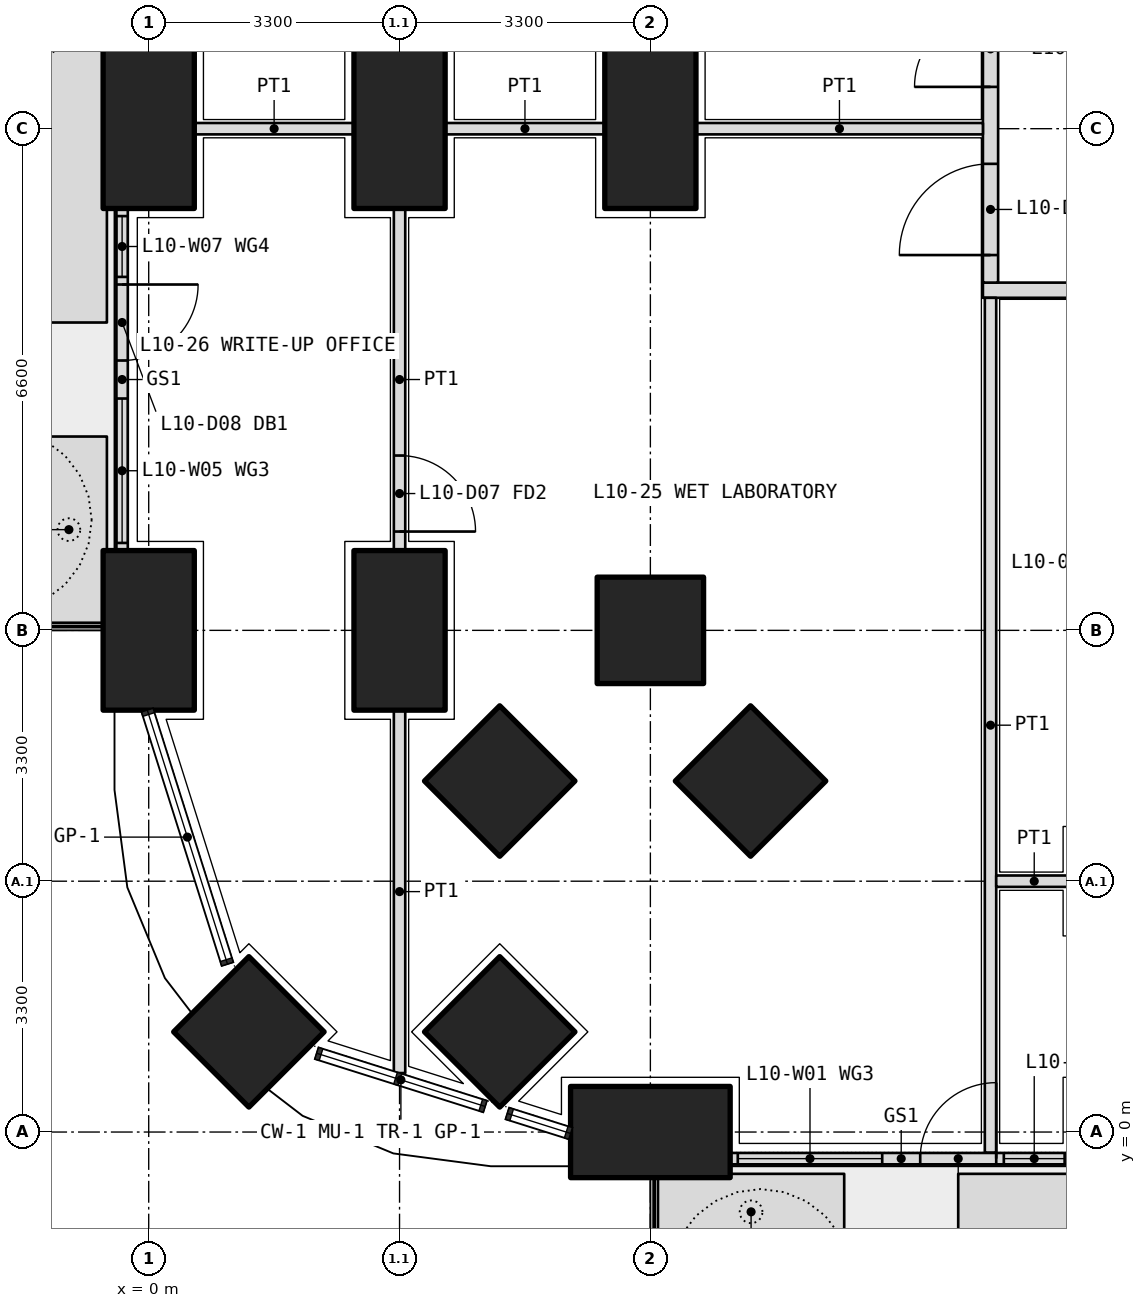
"""IFC4 building model, lengths in metres.
Left out: names, types, materials, properties, quantities, classifications, styles, units other than length and angle.
Written with IfcOpenShell. Run it as: python <this file> out.ifc"""

import sys

from ifc_helpers import new_model, si_unit, direction, frame, frame_2d, origin, origin_2d, place, context, subcontext, project, spatial, polyline, rectangle, outline, extrude, element, fill, save


model = new_model("IFC4")
c1 = context("Model", 3, precision=1e-05, world=origin(), true_north=direction((0.0, 1.0)))
c2 = subcontext(c1, "Body", "Model", "MODEL_VIEW")
j1 = project(units=[si_unit("LENGTHUNIT", "METRE"), si_unit("PLANEANGLEUNIT", "RADIAN")], contexts=[c1])
p1 = place(None, origin())
s1 = spatial("IfcSite", under=j1, at=p1, CompositionType="ELEMENT")
p2 = place(p1, origin())
s2 = spatial("IfcBuilding", under=s1, at=p2, CompositionType="ELEMENT")
p3 = place(p2, frame((0.0, 0.0, 46.5)))
s3 = spatial("IfcBuildingStorey", under=s2, at=p3, CompositionType="ELEMENT", Elevation=46.5)
p4 = place(p3, frame((1.318, 1.318, 0.0), z_axis=(0.0, 0.0, 1.0), x_axis=(0.707106781187, 0.707106781187, 0.0)))
e1 = element("IfcColumn", 1, at=p4, inside=s3, PredefinedType="COLUMN", context=c2, shape_type="SweptSolid", body=[
    extrude(rectangle(XDim=1.4, YDim=1.4, at=origin_2d()), origin(), (0.0, 0.0, 1.0), 4.2),
])
for number, where, z_axis, x_axis in (
    (2, (6.6, 0.0, 0.0), (0.0, 0.0, 1.0), (1.0, 0.0, 0.0)),
    (3, (0.0, 6.6, 0.0), (0.0, 0.0, 1.0), (0.0, 1.0, 0.0)),
    (4, (0.0, 13.2, 0.0), (0.0, 0.0, 1.0), (0.0, 1.0, 0.0)),
):
    element("IfcColumn", number, at=place(p3, frame(where, z_axis=z_axis, x_axis=x_axis)), inside=s3, PredefinedType="COLUMN", context=c2, shape_type="SweptSolid", body=[
        extrude(rectangle(XDim=2.1, YDim=1.2, at=origin_2d()), origin(), (0.0, 0.0, 1.0), 4.2),
    ])
for number, where, z_axis, x_axis in (
    (5, (6.6, 6.6, 0.0), (0.0, 0.0, 1.0), (1.0, 0.0, 0.0)),
    (6, (4.618, 1.318, 0.0), (0.0, 0.0, 1.0), (0.707, 0.707, 0.0)),
):
    element("IfcColumn", number, at=place(p3, frame(where, z_axis=z_axis, x_axis=x_axis)), inside=s3, PredefinedType="COLUMN", context=c2, shape_type="SweptSolid", body=[
        extrude(rectangle(XDim=1.4, YDim=1.4, at=origin_2d()), origin(), (0.0, 0.0, 1.0), 4.2),
    ])
for number, where, z_axis, x_axis in (
    (7, (3.3, 6.6, 0.0), (0.0, 0.0, 1.0), (0.0, 1.0, 0.0)),
    (8, (3.3, 13.2, 0.0), (0.0, 0.0, 1.0), (0.0, 1.0, 0.0)),
):
    element("IfcColumn", number, at=place(p3, frame(where, z_axis=z_axis, x_axis=x_axis)), inside=s3, PredefinedType="COLUMN", context=c2, shape_type="SweptSolid", body=[
        extrude(rectangle(XDim=2.1, YDim=1.2, at=origin_2d()), origin(), (0.0, 0.0, 1.0), 4.2),
    ])
for number, where, z_axis, x_axis in (
    (9, (4.618, 4.618, 0.0), (0.0, 0.0, 1.0), (0.707, 0.707, 0.0)),
    (10, (7.918, 4.618, 0.0), (0.0, 0.0, 1.0), (0.707, 0.707, 0.0)),
):
    element("IfcColumn", number, at=place(p3, frame(where, z_axis=z_axis, x_axis=x_axis)), inside=s3, PredefinedType="COLUMN", context=c2, shape_type="SweptSolid", body=[
        extrude(rectangle(XDim=1.4, YDim=1.4, at=origin_2d()), origin(), (0.0, 0.0, 1.0), 4.2),
    ])
p5 = place(p3, frame((6.6, 13.2, 0.0), z_axis=(0.0, 0.0, 1.0), x_axis=(0.0, 1.0, 0.0)))
e11 = element("IfcColumn", 11, at=p5, inside=s3, PredefinedType="COLUMN", context=c2, shape_type="SweptSolid", body=[
    extrude(rectangle(XDim=2.1, YDim=1.2, at=origin_2d()), origin(), (0.0, 0.0, 1.0), 4.2),
])
p6 = place(p3, origin())
e12 = element("IfcWall", 12, at=p6, inside=s3, PredefinedType="USERDEFINED", context=c2, shape_type="SweptSolid", body=[
    extrude(outline(polyline([(6.7, -1.55), (9.15, -1.55), (9.15, -0.55), (6.7, -0.55), (6.7, -1.55)]), holes=[polyline([(6.85, -1.4), (9.0, -1.4), (9.0, -0.7), (6.85, -0.7), (6.85, -1.4)])]), origin(), (0.0, 0.0, 1.0), 1.05),
])
p7 = place(p3, origin())
e13 = element("IfcWall", 13, at=p7, inside=s3, PredefinedType="USERDEFINED", context=c2, shape_type="SweptSolid", body=[
    extrude(outline(polyline([(10.65, -1.55), (19.7, -1.55), (19.7, -0.55), (10.65, -0.55), (10.65, -1.55)]), holes=[polyline([(10.8, -1.4), (19.55, -1.4), (19.55, -0.7), (10.8, -0.7), (10.8, -1.4)])]), origin(), (0.0, 0.0, 1.0), 1.05),
])
p8 = place(p3, origin())
e14 = element("IfcWall", 14, at=p8, inside=s3, PredefinedType="USERDEFINED", context=c2, shape_type="SweptSolid", body=[
    extrude(outline(polyline([(-1.55, 6.7), (-0.55, 6.7), (-0.55, 9.15), (-1.55, 9.15), (-1.55, 6.7)]), holes=[polyline([(-1.4, 6.85), (-0.7, 6.85), (-0.7, 9.0), (-1.4, 9.0), (-1.4, 6.85)])]), origin(), (0.0, 0.0, 1.0), 1.05),
])
p9 = place(p3, origin())
e15 = element("IfcWall", 15, at=p9, inside=s3, PredefinedType="USERDEFINED", context=c2, shape_type="SweptSolid", body=[
    extrude(outline(polyline([(-1.55, 10.65), (-0.55, 10.65), (-0.55, 19.7), (-1.55, 19.7), (-1.55, 10.65)]), holes=[polyline([(-1.4, 10.8), (-0.7, 10.8), (-0.7, 19.55), (-1.4, 19.55), (-1.4, 10.8)])]), origin(), (0.0, 0.0, 1.0), 1.05),
])
p10 = place(p3, frame((7.65, -0.35, 0.0), z_axis=(0.0, 0.0, 1.0), x_axis=(1.0, 0.0, 0.0)))
e16 = element("IfcWall", 16, at=p10, inside=s3, PredefinedType="SOLIDWALL", context=c2, shape_type="SweptSolid", body=[
    extrude(rectangle(XDim=4.5, YDim=0.15, at=frame_2d((2.25, 0.0))), origin(), (0.0, 0.0, 1.0), 2.7),
])
p11 = place(p10, frame((2.5, 0.0, 0.0)))
e17 = element("IfcOpeningElement", 17, at=p11, cuts=e16, PredefinedType="OPENING", context=c2, shape_type="SweptSolid", body=[
    extrude(rectangle(XDim=1.0, YDim=2.4, at=frame_2d((0.5, 1.2))), frame((0.0, 0.085, 0.0), z_axis=(0.0, -1.0, 0.0), x_axis=(1.0, 0.0, 0.0)), (0.0, 0.0, 1.0), 0.17),
])
p12 = place(p10, frame((0.1, 0.0, 0.1)))
e18 = element("IfcOpeningElement", 18, at=p12, cuts=e16, PredefinedType="OPENING", context=c2, shape_type="SweptSolid", body=[
    extrude(rectangle(XDim=1.9, YDim=2.3, at=frame_2d((0.95, 1.15))), frame((0.0, 0.085, 0.0), z_axis=(0.0, -1.0, 0.0), x_axis=(1.0, 0.0, 0.0)), (0.0, 0.0, 1.0), 0.17),
])
p13 = place(p10, frame((3.6, 0.0, 0.1)))
e19 = element("IfcOpeningElement", 19, at=p13, cuts=e16, PredefinedType="OPENING", context=c2, shape_type="SweptSolid", body=[
    extrude(rectangle(XDim=0.8, YDim=2.3, at=frame_2d((0.4, 1.15))), frame((0.0, 0.085, 0.0), z_axis=(0.0, -1.0, 0.0), x_axis=(1.0, 0.0, 0.0)), (0.0, 0.0, 1.0), 0.17),
])
p14 = place(p3, frame((-0.35, 12.15, 0.0), z_axis=(0.0, 0.0, 1.0), x_axis=(0.0, -1.0, 0.0)))
e20 = element("IfcWall", 20, at=p14, inside=s3, PredefinedType="SOLIDWALL", context=c2, shape_type="SweptSolid", body=[
    extrude(rectangle(XDim=4.5, YDim=0.15, at=frame_2d((2.25, 0.0))), origin(), (0.0, 0.0, 1.0), 2.7),
])
p15 = place(p14, frame((1.0, 0.0, 0.0)))
e21 = element("IfcOpeningElement", 21, at=p15, cuts=e20, PredefinedType="OPENING", context=c2, shape_type="SweptSolid", body=[
    extrude(rectangle(XDim=1.0, YDim=2.4, at=frame_2d((0.5, 1.2))), frame((0.0, 0.085, 0.0), z_axis=(0.0, -1.0, 0.0), x_axis=(1.0, 0.0, 0.0)), (0.0, 0.0, 1.0), 0.17),
])
p16 = place(p14, frame((0.1, 0.0, 0.1)))
e22 = element("IfcOpeningElement", 22, at=p16, cuts=e20, PredefinedType="OPENING", context=c2, shape_type="SweptSolid", body=[
    extrude(rectangle(XDim=0.8, YDim=2.3, at=frame_2d((0.4, 1.15))), frame((0.0, 0.085, 0.0), z_axis=(0.0, -1.0, 0.0), x_axis=(1.0, 0.0, 0.0)), (0.0, 0.0, 1.0), 0.17),
])
p17 = place(p14, frame((2.5, 0.0, 0.1)))
e23 = element("IfcOpeningElement", 23, at=p17, cuts=e20, PredefinedType="OPENING", context=c2, shape_type="SweptSolid", body=[
    extrude(rectangle(XDim=1.9, YDim=2.3, at=frame_2d((0.95, 1.15))), frame((0.0, 0.085, 0.0), z_axis=(0.0, -1.0, 0.0), x_axis=(1.0, 0.0, 0.0)), (0.0, 0.0, 1.0), 0.17),
])
p18 = place(p3, frame((10.975, 11.075, 0.0), z_axis=(0.0, 0.0, 1.0), x_axis=(1.0, 0.0, 0.0)))
e24 = element("IfcWall", 24, at=p18, inside=s3, PredefinedType="PARTITIONING", context=c2, shape_type="SweptSolid", body=[
    extrude(rectangle(XDim=30.85, YDim=0.2, at=frame_2d((15.425, 0.0))), origin(), (0.0, 0.0, 1.0), 2.85),
])
p19 = place(p18, frame((2.312, 0.0, 0.0)))
e25 = element("IfcOpeningElement", 25, at=p19, cuts=e24, PredefinedType="OPENING", context=c2, shape_type="SweptSolid", body=[
    extrude(rectangle(XDim=1.0, YDim=2.1, at=frame_2d((0.5, 1.05))), frame((0.0, 0.11, 0.0), z_axis=(0.0, -1.0, 0.0), x_axis=(1.0, 0.0, 0.0)), (0.0, 0.0, 1.0), 0.22),
])
p20 = place(p18, frame((6.575, 0.0, 0.0)))
e26 = element("IfcOpeningElement", 26, at=p20, cuts=e24, PredefinedType="OPENING", context=c2, shape_type="SweptSolid", body=[
    extrude(rectangle(XDim=1.2, YDim=2.1, at=frame_2d((0.6, 1.05))), frame((0.0, 0.11, 0.0), z_axis=(0.0, -1.0, 0.0), x_axis=(1.0, 0.0, 0.0)), (0.0, 0.0, 1.0), 0.22),
])
p21 = place(p18, frame((13.275, 0.0, 0.0)))
e27 = element("IfcOpeningElement", 27, at=p21, cuts=e24, PredefinedType="OPENING", context=c2, shape_type="SweptSolid", body=[
    extrude(rectangle(XDim=1.0, YDim=2.1, at=frame_2d((0.5, 1.05))), frame((0.0, 0.11, 0.0), z_axis=(0.0, -1.0, 0.0), x_axis=(1.0, 0.0, 0.0)), (0.0, 0.0, 1.0), 0.22),
])
p22 = place(p18, frame((19.975, 0.0, 0.0)))
e28 = element("IfcOpeningElement", 28, at=p22, cuts=e24, PredefinedType="OPENING", context=c2, shape_type="SweptSolid", body=[
    extrude(rectangle(XDim=1.0, YDim=2.1, at=frame_2d((0.5, 1.05))), frame((0.0, 0.11, 0.0), z_axis=(0.0, -1.0, 0.0), x_axis=(1.0, 0.0, 0.0)), (0.0, 0.0, 1.0), 0.22),
])
p23 = place(p18, frame((23.275, 0.0, 0.0)))
e29 = element("IfcOpeningElement", 29, at=p23, cuts=e24, PredefinedType="OPENING", context=c2, shape_type="SweptSolid", body=[
    extrude(rectangle(XDim=1.0, YDim=2.1, at=frame_2d((0.5, 1.05))), frame((0.0, 0.11, 0.0), z_axis=(0.0, -1.0, 0.0), x_axis=(1.0, 0.0, 0.0)), (0.0, 0.0, 1.0), 0.22),
])
p24 = place(p18, frame((27.438, 0.0, 0.0)))
e30 = element("IfcOpeningElement", 30, at=p24, cuts=e24, PredefinedType="OPENING", context=c2, shape_type="SweptSolid", body=[
    extrude(rectangle(XDim=1.2, YDim=2.1, at=frame_2d((0.6, 1.05))), frame((0.0, 0.11, 0.0), z_axis=(0.0, -1.0, 0.0), x_axis=(1.0, 0.0, 0.0)), (0.0, 0.0, 1.0), 0.22),
])
p25 = place(p3, frame((11.075, 11.175, 0.0), z_axis=(0.0, 0.0, 1.0), x_axis=(0.0, 1.0, 0.0)))
e31 = element("IfcWall", 31, at=p25, inside=s3, PredefinedType="PARTITIONING", context=c2, shape_type="SweptSolid", body=[
    extrude(rectangle(XDim=15.225, YDim=0.2, at=frame_2d((7.612, 0.0))), origin(), (0.0, 0.0, 1.0), 2.85),
])
p26 = place(p25, frame((0.363, 0.0, 0.0)))
e32 = element("IfcOpeningElement", 32, at=p26, cuts=e31, PredefinedType="OPENING", context=c2, shape_type="SweptSolid", body=[
    extrude(rectangle(XDim=1.2, YDim=2.1, at=frame_2d((0.6, 1.05))), frame((0.0, 0.11, 0.0), z_axis=(0.0, -1.0, 0.0), x_axis=(1.0, 0.0, 0.0)), (0.0, 0.0, 1.0), 0.22),
])
p27 = place(p25, frame((2.575, 0.0, 0.0)))
e33 = element("IfcOpeningElement", 33, at=p27, cuts=e31, PredefinedType="OPENING", context=c2, shape_type="SweptSolid", body=[
    extrude(rectangle(XDim=1.0, YDim=2.1, at=frame_2d((0.5, 1.05))), frame((0.0, 0.11, 0.0), z_axis=(0.0, -1.0, 0.0), x_axis=(1.0, 0.0, 0.0)), (0.0, 0.0, 1.0), 0.22),
])
p28 = place(p25, frame((5.625, 0.0, 0.0)))
e34 = element("IfcOpeningElement", 34, at=p28, cuts=e31, PredefinedType="OPENING", context=c2, shape_type="SweptSolid", body=[
    extrude(rectangle(XDim=0.9, YDim=2.1, at=frame_2d((0.45, 1.05))), frame((0.0, 0.11, 0.0), z_axis=(0.0, -1.0, 0.0), x_axis=(1.0, 0.0, 0.0)), (0.0, 0.0, 1.0), 0.22),
])
p29 = place(p25, frame((9.425, 0.0, 0.0)))
e35 = element("IfcOpeningElement", 35, at=p29, cuts=e31, PredefinedType="OPENING", context=c2, shape_type="SweptSolid", body=[
    extrude(rectangle(XDim=0.9, YDim=2.1, at=frame_2d((0.45, 1.05))), frame((0.0, 0.11, 0.0), z_axis=(0.0, -1.0, 0.0), x_axis=(1.0, 0.0, 0.0)), (0.0, 0.0, 1.0), 0.22),
])
p30 = place(p25, frame((12.975, 0.0, 0.0)))
e36 = element("IfcOpeningElement", 36, at=p30, cuts=e31, PredefinedType="OPENING", context=c2, shape_type="SweptSolid", body=[
    extrude(rectangle(XDim=1.0, YDim=2.1, at=frame_2d((0.5, 1.05))), frame((0.0, 0.11, 0.0), z_axis=(0.0, -1.0, 0.0), x_axis=(1.0, 0.0, 0.0)), (0.0, 0.0, 1.0), 0.22),
])
p31 = place(p3, frame((11.075, -0.27, 0.0), z_axis=(0.0, 0.0, 1.0), x_axis=(0.0, 1.0, 0.0)))
e37 = element("IfcWall", 37, at=p31, inside=s3, PredefinedType="PARTITIONING", context=c2, shape_type="SweptSolid", body=[
    extrude(rectangle(XDim=11.245, YDim=0.15, at=frame_2d((5.623, 0.0))), origin(), (0.0, 0.0, 1.0), 2.7),
])
p32 = place(p3, frame((11.15, 3.3, 0.0), z_axis=(0.0, 0.0, 1.0), x_axis=(1.0, 0.0, 0.0)))
e38 = element("IfcWall", 38, at=p32, inside=s3, PredefinedType="PARTITIONING", context=c2, shape_type="SweptSolid", body=[
    extrude(rectangle(XDim=1.0, YDim=0.15, at=frame_2d((0.5, 0.0))), origin(), (0.0, 0.0, 1.0), 3.9),
])
p33 = place(p3, frame((3.3, 12.15, 0.0), z_axis=(0.0, 0.0, 1.0), x_axis=(0.0, -1.0, 0.0)))
e39 = element("IfcWall", 39, at=p33, inside=s3, PredefinedType="PARTITIONING", context=c2, shape_type="SweptSolid", body=[
    extrude(rectangle(XDim=4.5, YDim=0.15, at=frame_2d((2.25, 0.0))), origin(), (0.0, 0.0, 1.0), 3.9),
])
p34 = place(p33, frame((3.25, 0.0, 0.0)))
e40 = element("IfcOpeningElement", 40, at=p34, cuts=e39, PredefinedType="OPENING", context=c2, shape_type="SweptSolid", body=[
    extrude(rectangle(XDim=1.0, YDim=2.1, at=frame_2d((0.5, 1.05))), frame((0.0, 0.085, 0.0), z_axis=(0.0, -1.0, 0.0), x_axis=(1.0, 0.0, 0.0)), (0.0, 0.0, 1.0), 0.17),
])
p35 = place(p3, frame((3.3, 5.55, 0.0), z_axis=(0.0, 0.0, 1.0), x_axis=(0.0, -1.0, 0.0)))
e41 = element("IfcWall", 41, at=p35, inside=s3, PredefinedType="PARTITIONING", context=c2, shape_type="SweptSolid", body=[
    extrude(rectangle(XDim=4.774, YDim=0.15, at=frame_2d((2.387, 0.0))), origin(), (0.0, 0.0, 1.0), 2.7),
])
p36 = place(p3, frame((0.6, 13.2, 0.0), z_axis=(0.0, 0.0, 1.0), x_axis=(1.0, 0.0, 0.0)))
e42 = element("IfcWall", 42, at=p36, inside=s3, PredefinedType="PARTITIONING", context=c2, shape_type="SweptSolid", body=[
    extrude(rectangle(XDim=2.1, YDim=0.15, at=frame_2d((1.05, 0.0))), origin(), (0.0, 0.0, 1.0), 2.85),
])
p37 = place(p3, frame((3.9, 13.2, 0.0), z_axis=(0.0, 0.0, 1.0), x_axis=(1.0, 0.0, 0.0)))
e43 = element("IfcWall", 43, at=p37, inside=s3, PredefinedType="PARTITIONING", context=c2, shape_type="SweptSolid", body=[
    extrude(rectangle(XDim=2.1, YDim=0.15, at=frame_2d((1.05, 0.0))), origin(), (0.0, 0.0, 1.0), 2.85),
])
p38 = place(p3, frame((7.2, 13.2, 0.0), z_axis=(0.0, 0.0, 1.0), x_axis=(1.0, 0.0, 0.0)))
e44 = element("IfcWall", 44, at=p38, inside=s3, PredefinedType="PARTITIONING", context=c2, shape_type="SweptSolid", body=[
    extrude(rectangle(XDim=3.775, YDim=0.15, at=frame_2d((1.888, 0.0))), origin(), (0.0, 0.0, 1.0), 2.85),
])
p39 = place(p11, origin())
e45 = element("IfcDoor", 45, at=p39, inside=s3, OperationType="SINGLE_SWING_RIGHT", PredefinedType="DOOR", context=c2, shape_type="SweptSolid", body=[
    extrude(rectangle(XDim=1.0, YDim=2.4, at=frame_2d((0.5, 1.2))), frame((0.0, 0.025, 0.0), z_axis=(0.0, -1.0, 0.0), x_axis=(1.0, 0.0, 0.0)), (0.0, 0.0, 1.0), 0.05),
])
fill(e17, e45)
p40 = place(p12, origin())
e46 = element("IfcWindow", 46, at=p40, inside=s3, PartitioningType="SINGLE_PANEL", PredefinedType="WINDOW", context=c2, shape_type="SweptSolid", body=[
    extrude(rectangle(XDim=1.9, YDim=2.3, at=frame_2d((0.95, 1.15))), frame((0.0, 0.03, 0.0), z_axis=(0.0, -1.0, 0.0), x_axis=(1.0, 0.0, 0.0)), (0.0, 0.0, 1.0), 0.06),
])
fill(e18, e46)
p41 = place(p13, origin())
e47 = element("IfcWindow", 47, at=p41, inside=s3, PartitioningType="SINGLE_PANEL", PredefinedType="WINDOW", context=c2, shape_type="SweptSolid", body=[
    extrude(rectangle(XDim=0.8, YDim=2.3, at=frame_2d((0.4, 1.15))), frame((0.0, 0.03, 0.0), z_axis=(0.0, -1.0, 0.0), x_axis=(1.0, 0.0, 0.0)), (0.0, 0.0, 1.0), 0.06),
])
fill(e19, e47)
p42 = place(p15, origin())
e48 = element("IfcDoor", 48, at=p42, inside=s3, OperationType="SINGLE_SWING_LEFT", PredefinedType="DOOR", context=c2, shape_type="SweptSolid", body=[
    extrude(rectangle(XDim=1.0, YDim=2.4, at=frame_2d((0.5, 1.2))), frame((0.0, 0.025, 0.0), z_axis=(0.0, -1.0, 0.0), x_axis=(1.0, 0.0, 0.0)), (0.0, 0.0, 1.0), 0.05),
])
fill(e21, e48)
p43 = place(p16, origin())
e49 = element("IfcWindow", 49, at=p43, inside=s3, PartitioningType="SINGLE_PANEL", PredefinedType="WINDOW", context=c2, shape_type="SweptSolid", body=[
    extrude(rectangle(XDim=0.8, YDim=2.3, at=frame_2d((0.4, 1.15))), frame((0.0, 0.03, 0.0), z_axis=(0.0, -1.0, 0.0), x_axis=(1.0, 0.0, 0.0)), (0.0, 0.0, 1.0), 0.06),
])
fill(e22, e49)
p44 = place(p17, origin())
e50 = element("IfcWindow", 50, at=p44, inside=s3, PartitioningType="SINGLE_PANEL", PredefinedType="WINDOW", context=c2, shape_type="SweptSolid", body=[
    extrude(rectangle(XDim=1.9, YDim=2.3, at=frame_2d((0.95, 1.15))), frame((0.0, 0.03, 0.0), z_axis=(0.0, -1.0, 0.0), x_axis=(1.0, 0.0, 0.0)), (0.0, 0.0, 1.0), 0.06),
])
fill(e23, e50)
p45 = place(p26, origin())
e51 = element("IfcDoor", 51, at=p45, inside=s3, OperationType="DOUBLE_DOOR_SINGLE_SWING", PredefinedType="DOOR", context=c2, shape_type="SweptSolid", body=[
    extrude(rectangle(XDim=1.2, YDim=2.1, at=frame_2d((0.6, 1.05))), frame((0.0, 0.025, 0.0), z_axis=(0.0, -1.0, 0.0), x_axis=(1.0, 0.0, 0.0)), (0.0, 0.0, 1.0), 0.05),
])
fill(e32, e51)
p46 = place(p34, origin())
e52 = element("IfcDoor", 52, at=p46, inside=s3, OperationType="SINGLE_SWING_RIGHT", PredefinedType="DOOR", context=c2, shape_type="SweptSolid", body=[
    extrude(rectangle(XDim=1.0, YDim=2.1, at=frame_2d((0.5, 1.05))), frame((0.0, 0.025, 0.0), z_axis=(0.0, -1.0, 0.0), x_axis=(1.0, 0.0, 0.0)), (0.0, 0.0, 1.0), 0.05),
])
fill(e40, e52)
p47 = place(p27, origin())
e53 = element("IfcDoor", 53, at=p47, inside=s3, OperationType="SINGLE_SWING_LEFT", PredefinedType="DOOR", context=c2, shape_type="SweptSolid", body=[
    extrude(rectangle(XDim=1.0, YDim=2.1, at=frame_2d((0.5, 1.05))), frame((0.0, 0.025, 0.0), z_axis=(0.0, -1.0, 0.0), x_axis=(1.0, 0.0, 0.0)), (0.0, 0.0, 1.0), 0.05),
])
fill(e33, e53)
save(model, sys.argv[1])
